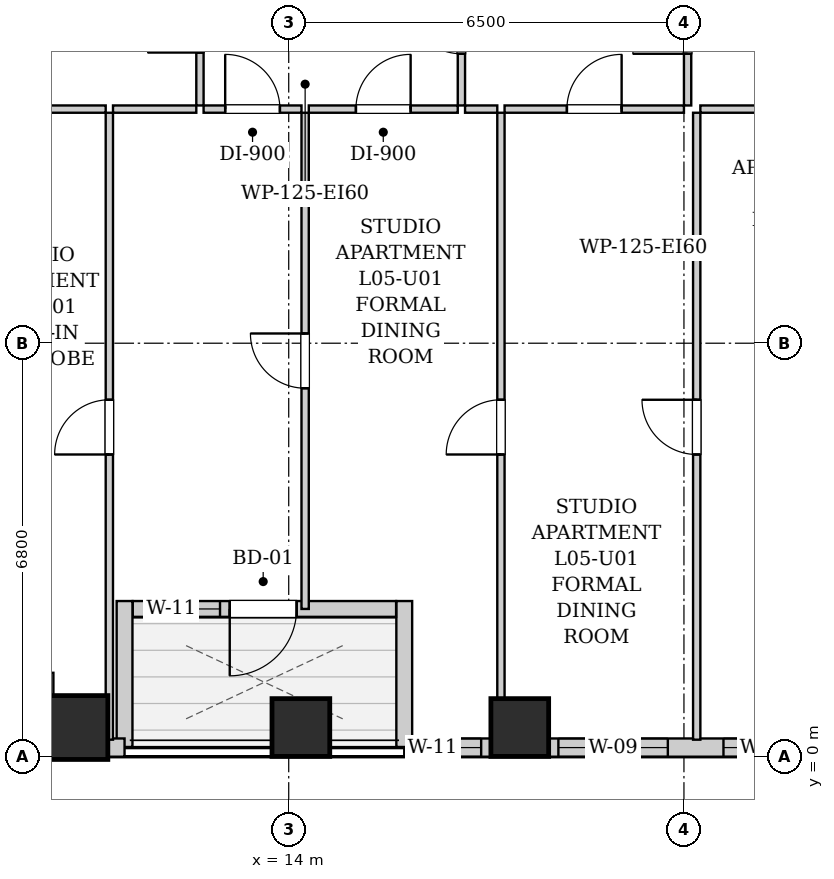
"""IFC4 building model, lengths in metres.
Left out: names, types, materials, properties, quantities, classifications, styles, units other than length and angle.
Written with IfcOpenShell. Run it as: python <this file> out.ifc"""

import sys

from ifc_helpers import new_model, si_unit, direction, frame, frame_2d, origin, origin_2d, place, context, subcontext, project, spatial, rectangle, extrude, element, fill, save


model = new_model("IFC4")
c1 = context("Model", 3, precision=1e-05, world=origin(), true_north=direction((0.0, 1.0)))
c2 = subcontext(c1, "Body", "Model", "MODEL_VIEW")
j1 = project(units=[si_unit("LENGTHUNIT", "METRE"), si_unit("PLANEANGLEUNIT", "RADIAN")], contexts=[c1])
p1 = place(None, origin())
s1 = spatial("IfcSite", under=j1, at=p1, CompositionType="ELEMENT")
p2 = place(p1, origin())
s2 = spatial("IfcBuilding", under=s1, at=p2, CompositionType="ELEMENT")
p3 = place(p2, frame((0.0, 0.0, 25.8)))
s3 = spatial("IfcBuildingStorey", under=s2, at=p3, CompositionType="ELEMENT", Elevation=25.8)
p4 = place(p3, frame((10.5, 0.48, 0.0), z_axis=(0.0, 0.0, 1.0), x_axis=(1.0, 0.0, 0.0)))
e1 = element("IfcColumn", 1, at=p4, inside=s3, PredefinedType="COLUMN", context=c2, shape_type="SweptSolid", body=[
    extrude(rectangle(XDim=1.05, YDim=1.05, at=origin_2d()), origin(), (0.0, 0.0, 1.0), 3.2),
])
for number, where, z_axis, x_axis in (
    (2, (14.2, 0.48, 0.0), (0.0, 0.0, 1.0), (1.0, 0.0, 0.0)),
    (3, (17.8, 0.48, 0.0), (0.0, 0.0, 1.0), (1.0, 0.0, 0.0)),
):
    element("IfcColumn", number, at=place(p3, frame(where, z_axis=z_axis, x_axis=x_axis)), inside=s3, PredefinedType="COLUMN", context=c2, shape_type="SweptSolid", body=[
        extrude(rectangle(XDim=0.95, YDim=0.95, at=origin_2d()), origin(), (0.0, 0.0, 1.0), 3.2),
    ])
p5 = place(p3, frame((44.0, 0.15, 0.0), z_axis=(0.0, 0.0, 1.0), x_axis=(-1.0, 0.0, 0.0)))
e4 = element("IfcWall", 4, at=p5, inside=s3, PredefinedType="SOLIDWALL", context=c2, shape_type="SweptSolid", body=[
    extrude(rectangle(XDim=28.1, YDim=0.3, at=frame_2d((14.05, 0.0))), origin(), (0.0, 0.0, 1.0), 1.975),
])
p6 = place(p5, frame((26.835, 0.0, 0.55)))
e5 = element("IfcOpeningElement", 5, at=p6, cuts=e4, PredefinedType="OPENING", context=c2, shape_type="SweptSolid", body=[
    extrude(rectangle(XDim=0.85, YDim=1.2, at=frame_2d((0.425, 0.6))), frame((0.0, 0.16, 0.0), z_axis=(0.0, -1.0, 0.0), x_axis=(1.0, 0.0, 0.0)), (0.0, 0.0, 1.0), 0.32),
])
p7 = place(p5, frame((23.765, 0.0, 0.55)))
e6 = element("IfcOpeningElement", 6, at=p7, cuts=e4, PredefinedType="OPENING", context=c2, shape_type="SweptSolid", body=[
    extrude(rectangle(XDim=1.8, YDim=1.2, at=frame_2d((0.9, 0.6))), frame((0.0, 0.16, 0.0), z_axis=(0.0, -1.0, 0.0), x_axis=(1.0, 0.0, 0.0)), (0.0, 0.0, 1.0), 0.32),
])
p8 = place(p5, frame((21.5, 0.0, 0.55)))
e7 = element("IfcOpeningElement", 7, at=p8, cuts=e4, PredefinedType="OPENING", context=c2, shape_type="SweptSolid", body=[
    extrude(rectangle(XDim=1.35, YDim=1.2, at=frame_2d((0.675, 0.6))), frame((0.0, 0.16, 0.0), z_axis=(0.0, -1.0, 0.0), x_axis=(1.0, 0.0, 0.0)), (0.0, 0.0, 1.0), 0.32),
])
p9 = place(p5, frame((14.352, 0.0, 0.55)))
e8 = element("IfcOpeningElement", 8, at=p9, cuts=e4, PredefinedType="OPENING", context=c2, shape_type="SweptSolid", body=[
    extrude(rectangle(XDim=1.8, YDim=1.2, at=frame_2d((0.9, 0.6))), frame((0.0, 0.16, 0.0), z_axis=(0.0, -1.0, 0.0), x_axis=(1.0, 0.0, 0.0)), (0.0, 0.0, 1.0), 0.32),
])
p10 = place(p5, frame((11.435, 0.0, 0.55)))
e9 = element("IfcOpeningElement", 9, at=p10, cuts=e4, PredefinedType="OPENING", context=c2, shape_type="SweptSolid", body=[
    extrude(rectangle(XDim=1.8, YDim=1.2, at=frame_2d((0.9, 0.6))), frame((0.0, 0.16, 0.0), z_axis=(0.0, -1.0, 0.0), x_axis=(1.0, 0.0, 0.0)), (0.0, 0.0, 1.0), 0.32),
])
p11 = place(p5, frame((7.891, 0.0, 0.55)))
e10 = element("IfcOpeningElement", 10, at=p11, cuts=e4, PredefinedType="OPENING", context=c2, shape_type="SweptSolid", body=[
    extrude(rectangle(XDim=1.8, YDim=1.2, at=frame_2d((0.9, 0.6))), frame((0.0, 0.16, 0.0), z_axis=(0.0, -1.0, 0.0), x_axis=(1.0, 0.0, 0.0)), (0.0, 0.0, 1.0), 0.32),
])
p12 = place(p5, frame((4.315, 0.0, 0.55)))
e11 = element("IfcOpeningElement", 11, at=p12, cuts=e4, PredefinedType="OPENING", context=c2, shape_type="SweptSolid", body=[
    extrude(rectangle(XDim=0.85, YDim=1.2, at=frame_2d((0.425, 0.6))), frame((0.0, 0.16, 0.0), z_axis=(0.0, -1.0, 0.0), x_axis=(1.0, 0.0, 0.0)), (0.0, 0.0, 1.0), 0.32),
])
p13 = place(p3, frame((15.9, 0.16, 0.0), z_axis=(0.0, 0.0, 1.0), x_axis=(0.0, 1.0, 0.0)))
e12 = element("IfcWall", 12, at=p13, inside=s3, PredefinedType="SOLIDWALL", context=c2, shape_type="SweptSolid", body=[
    extrude(rectangle(XDim=2.4, YDim=0.26, at=frame_2d((1.2, 0.0))), origin(), (0.0, 0.0, 1.0), 2.94),
])
p14 = place(p3, frame((15.766, 2.43, 0.0), z_axis=(0.0, 0.0, 1.0), x_axis=(-1.0, 0.0, 0.0)))
e13 = element("IfcWall", 13, at=p14, inside=s3, PredefinedType="SOLIDWALL", context=c2, shape_type="SweptSolid", body=[
    extrude(rectangle(XDim=4.332, YDim=0.26, at=frame_2d((2.166, 0.0))), origin(), (0.0, 0.0, 1.0), 2.94),
])
p15 = place(p14, frame((1.636, 0.0, 0.0)))
e14 = element("IfcOpeningElement", 14, at=p15, cuts=e13, PredefinedType="OPENING", context=c2, shape_type="SweptSolid", body=[
    extrude(rectangle(XDim=1.1, YDim=2.0, at=frame_2d((0.55, 1.0))), frame((0.0, 0.14, 0.0), z_axis=(0.0, -1.0, 0.0), x_axis=(1.0, 0.0, 0.0)), (0.0, 0.0, 1.0), 0.28),
])
p16 = place(p14, frame((2.896, 0.0, 0.55)))
e15 = element("IfcOpeningElement", 15, at=p16, cuts=e13, PredefinedType="OPENING", context=c2, shape_type="SweptSolid", body=[
    extrude(rectangle(XDim=0.85, YDim=1.2, at=frame_2d((0.425, 0.6))), frame((0.0, 0.14, 0.0), z_axis=(0.0, -1.0, 0.0), x_axis=(1.0, 0.0, 0.0)), (0.0, 0.0, 1.0), 0.28),
])
p17 = place(p3, frame((11.3, 2.56, 0.0), z_axis=(0.0, 0.0, 1.0), x_axis=(0.0, -1.0, 0.0)))
e16 = element("IfcWall", 16, at=p17, inside=s3, PredefinedType="SOLIDWALL", context=c2, shape_type="SweptSolid", body=[
    extrude(rectangle(XDim=2.4, YDim=0.26, at=frame_2d((1.2, 0.0))), origin(), (0.0, 0.0, 1.0), 2.94),
])
p18 = place(p3, frame((11.3, 0.15, 0.0), z_axis=(0.0, 0.0, 1.0), x_axis=(-1.0, 0.0, 0.0)))
e17 = element("IfcWall", 17, at=p18, inside=s3, PredefinedType="SOLIDWALL", context=c2, shape_type="SweptSolid", body=[
    extrude(rectangle(XDim=1.3, YDim=0.3, at=frame_2d((0.65, 0.0))), origin(), (0.0, 0.0, 1.0), 1.975),
])
p19 = place(p3, frame((10.0, 0.302, 0.0), z_axis=(0.0, 0.0, 1.0), x_axis=(0.0, 1.0, 0.0)))
e18 = element("IfcWall", 18, at=p19, inside=s3, PredefinedType="SOLIDWALL", context=c2, shape_type="SweptSolid", body=[
    extrude(rectangle(XDim=1.078, YDim=0.26, at=frame_2d((0.539, 0.0))), origin(), (0.0, 0.0, 1.0), 2.94),
])
p20 = place(p3, frame((12.54, 10.71, 0.0), z_axis=(0.0, 0.0, 1.0), x_axis=(0.0, 1.0, 0.0)))
e19 = element("IfcWall", 19, at=p20, inside=s3, PredefinedType="PARTITIONING", context=c2, shape_type="SweptSolid", body=[
    extrude(rectangle(XDim=2.6, YDim=0.12, at=frame_2d((1.3, 0.0))), origin(), (0.0, 0.0, 1.0), 2.94),
])
p21 = place(p20, frame((0.87, 0.0, 0.0)))
e20 = element("IfcOpeningElement", 20, at=p21, cuts=e19, PredefinedType="OPENING", context=c2, shape_type="SweptSolid", body=[
    extrude(rectangle(XDim=0.86, YDim=2.05, at=frame_2d((0.43, 1.025))), frame((0.0, 0.07, 0.0), z_axis=(0.0, -1.0, 0.0), x_axis=(1.0, 0.0, 0.0)), (0.0, 0.0, 1.0), 0.14),
])
p22 = place(p3, frame((10.08, 10.65, 0.0), z_axis=(0.0, 0.0, 1.0), x_axis=(1.0, 0.0, 0.0)))
e21 = element("IfcWall", 21, at=p22, inside=s3, PredefinedType="PARTITIONING", context=c2, shape_type="SweptSolid", body=[
    extrude(rectangle(XDim=0.91, YDim=0.12, at=frame_2d((0.455, 0.0))), origin(), (0.0, 0.0, 1.0), 2.94),
])
p23 = place(p3, frame((11.11, 10.65, 0.0), z_axis=(0.0, 0.0, 1.0), x_axis=(1.0, 0.0, 0.0)))
e22 = element("IfcWall", 22, at=p23, inside=s3, PredefinedType="PARTITIONING", context=c2, shape_type="SweptSolid", body=[
    extrude(rectangle(XDim=1.37, YDim=0.12, at=frame_2d((0.685, 0.0))), origin(), (0.0, 0.0, 1.0), 2.94),
])
p24 = place(p3, frame((16.84, 10.71, 0.0), z_axis=(0.0, 0.0, 1.0), x_axis=(0.0, 1.0, 0.0)))
e23 = element("IfcWall", 23, at=p24, inside=s3, PredefinedType="PARTITIONING", context=c2, shape_type="SweptSolid", body=[
    extrude(rectangle(XDim=2.6, YDim=0.12, at=frame_2d((1.3, 0.0))), origin(), (0.0, 0.0, 1.0), 2.94),
])
p25 = place(p24, frame((0.85, 0.0, 0.0)))
e24 = element("IfcOpeningElement", 24, at=p25, cuts=e23, PredefinedType="OPENING", context=c2, shape_type="SweptSolid", body=[
    extrude(rectangle(XDim=0.9, YDim=2.05, at=frame_2d((0.45, 1.025))), frame((0.0, 0.07, 0.0), z_axis=(0.0, -1.0, 0.0), x_axis=(1.0, 0.0, 0.0)), (0.0, 0.0, 1.0), 0.14),
])
p26 = place(p3, frame((12.6, 10.65, 0.0), z_axis=(0.0, 0.0, 1.0), x_axis=(1.0, 0.0, 0.0)))
e25 = element("IfcWall", 25, at=p26, inside=s3, PredefinedType="PARTITIONING", context=c2, shape_type="SweptSolid", body=[
    extrude(rectangle(XDim=1.61, YDim=0.12, at=frame_2d((0.805, 0.0))), origin(), (0.0, 0.0, 1.0), 2.94),
])
p27 = place(p26, frame((0.355, 0.0, 0.0)))
e26 = element("IfcOpeningElement", 26, at=p27, cuts=e25, PredefinedType="OPENING", context=c2, shape_type="SweptSolid", body=[
    extrude(rectangle(XDim=0.9, YDim=2.05, at=frame_2d((0.45, 1.025))), frame((0.0, 0.07, 0.0), z_axis=(0.0, -1.0, 0.0), x_axis=(1.0, 0.0, 0.0)), (0.0, 0.0, 1.0), 0.14),
])
p28 = place(p3, frame((14.33, 10.65, 0.0), z_axis=(0.0, 0.0, 1.0), x_axis=(1.0, 0.0, 0.0)))
e27 = element("IfcWall", 27, at=p28, inside=s3, PredefinedType="PARTITIONING", context=c2, shape_type="SweptSolid", body=[
    extrude(rectangle(XDim=2.45, YDim=0.12, at=frame_2d((1.225, 0.0))), origin(), (0.0, 0.0, 1.0), 2.94),
])
p29 = place(p28, frame((0.775, 0.0, 0.0)))
e28 = element("IfcOpeningElement", 28, at=p29, cuts=e27, PredefinedType="OPENING", context=c2, shape_type="SweptSolid", body=[
    extrude(rectangle(XDim=0.9, YDim=2.05, at=frame_2d((0.45, 1.025))), frame((0.0, 0.07, 0.0), z_axis=(0.0, -1.0, 0.0), x_axis=(1.0, 0.0, 0.0)), (0.0, 0.0, 1.0), 0.14),
])
p30 = place(p3, frame((20.56, 10.71, 0.0), z_axis=(0.0, 0.0, 1.0), x_axis=(0.0, 1.0, 0.0)))
e29 = element("IfcWall", 29, at=p30, inside=s3, PredefinedType="PARTITIONING", context=c2, shape_type="SweptSolid", body=[
    extrude(rectangle(XDim=2.6, YDim=0.12, at=frame_2d((1.3, 0.0))), origin(), (0.0, 0.0, 1.0), 2.94),
])
p31 = place(p30, frame((0.85, 0.0, 0.0)))
e30 = element("IfcOpeningElement", 30, at=p31, cuts=e29, PredefinedType="OPENING", context=c2, shape_type="SweptSolid", body=[
    extrude(rectangle(XDim=0.9, YDim=2.05, at=frame_2d((0.45, 1.025))), frame((0.0, 0.07, 0.0), z_axis=(0.0, -1.0, 0.0), x_axis=(1.0, 0.0, 0.0)), (0.0, 0.0, 1.0), 0.14),
])
p32 = place(p3, frame((16.9, 10.65, 0.0), z_axis=(0.0, 0.0, 1.0), x_axis=(1.0, 0.0, 0.0)))
e31 = element("IfcWall", 31, at=p32, inside=s3, PredefinedType="PARTITIONING", context=c2, shape_type="SweptSolid", body=[
    extrude(rectangle(XDim=0.53, YDim=0.12, at=frame_2d((0.265, 0.0))), origin(), (0.0, 0.0, 1.0), 2.94),
])
p33 = place(p3, frame((17.55, 10.65, 0.0), z_axis=(0.0, 0.0, 1.0), x_axis=(1.0, 0.0, 0.0)))
e32 = element("IfcWall", 32, at=p33, inside=s3, PredefinedType="PARTITIONING", context=c2, shape_type="SweptSolid", body=[
    extrude(rectangle(XDim=2.95, YDim=0.12, at=frame_2d((1.475, 0.0))), origin(), (0.0, 0.0, 1.0), 2.94),
])
p34 = place(p33, frame((1.025, 0.0, 0.0)))
e33 = element("IfcOpeningElement", 33, at=p34, cuts=e32, PredefinedType="OPENING", context=c2, shape_type="SweptSolid", body=[
    extrude(rectangle(XDim=0.9, YDim=2.05, at=frame_2d((0.45, 1.025))), frame((0.0, 0.07, 0.0), z_axis=(0.0, -1.0, 0.0), x_axis=(1.0, 0.0, 0.0)), (0.0, 0.0, 1.0), 0.14),
])
p35 = place(p3, frame((20.77, 10.65, 0.0), z_axis=(0.0, 0.0, 1.0), x_axis=(1.0, 0.0, 0.0)))
e34 = element("IfcWall", 34, at=p35, inside=s3, PredefinedType="PARTITIONING", context=c2, shape_type="SweptSolid", body=[
    extrude(rectangle(XDim=3.0, YDim=0.12, at=frame_2d((1.5, 0.0))), origin(), (0.0, 0.0, 1.0), 2.94),
])
p36 = place(p35, frame((1.05, 0.0, 0.0)))
e35 = element("IfcOpeningElement", 35, at=p36, cuts=e34, PredefinedType="OPENING", context=c2, shape_type="SweptSolid", body=[
    extrude(rectangle(XDim=0.9, YDim=2.05, at=frame_2d((0.45, 1.025))), frame((0.0, 0.07, 0.0), z_axis=(0.0, -1.0, 0.0), x_axis=(1.0, 0.0, 0.0)), (0.0, 0.0, 1.0), 0.14),
])
p37 = place(p3, frame((11.05, 0.28, 0.0), z_axis=(0.0, 0.0, 1.0), x_axis=(0.0, 1.0, 0.0)))
e36 = element("IfcWall", 36, at=p37, inside=s3, PredefinedType="PARTITIONING", context=c2, shape_type="SweptSolid", body=[
    extrude(rectangle(XDim=10.31, YDim=0.12, at=frame_2d((5.155, 0.0))), origin(), (0.0, 0.0, 1.0), 2.94),
])
p38 = place(p37, frame((4.69, 0.0, 0.0)))
e37 = element("IfcOpeningElement", 37, at=p38, cuts=e36, PredefinedType="OPENING", context=c2, shape_type="SweptSolid", body=[
    extrude(rectangle(XDim=0.9, YDim=2.05, at=frame_2d((0.45, 1.025))), frame((0.0, 0.07, 0.0), z_axis=(0.0, -1.0, 0.0), x_axis=(1.0, 0.0, 0.0)), (0.0, 0.0, 1.0), 0.14),
])
p39 = place(p3, frame((14.27, 2.43, 0.0), z_axis=(0.0, 0.0, 1.0), x_axis=(0.0, 1.0, 0.0)))
e38 = element("IfcWall", 38, at=p39, inside=s3, PredefinedType="PARTITIONING", context=c2, shape_type="SweptSolid", body=[
    extrude(rectangle(XDim=8.16, YDim=0.12, at=frame_2d((4.08, 0.0))), origin(), (0.0, 0.0, 1.0), 2.94),
])
p40 = place(p39, frame((3.63, 0.0, 0.0)))
e39 = element("IfcOpeningElement", 39, at=p40, cuts=e38, PredefinedType="OPENING", context=c2, shape_type="SweptSolid", body=[
    extrude(rectangle(XDim=0.9, YDim=2.05, at=frame_2d((0.45, 1.025))), frame((0.0, 0.07, 0.0), z_axis=(0.0, -1.0, 0.0), x_axis=(1.0, 0.0, 0.0)), (0.0, 0.0, 1.0), 0.14),
])
p41 = place(p3, frame((17.49, 0.28, 0.0), z_axis=(0.0, 0.0, 1.0), x_axis=(0.0, 1.0, 0.0)))
e40 = element("IfcWall", 40, at=p41, inside=s3, PredefinedType="PARTITIONING", context=c2, shape_type="SweptSolid", body=[
    extrude(rectangle(XDim=10.31, YDim=0.12, at=frame_2d((5.155, 0.0))), origin(), (0.0, 0.0, 1.0), 2.94),
])
p42 = place(p41, frame((4.69, 0.0, 0.0)))
e41 = element("IfcOpeningElement", 41, at=p42, cuts=e40, PredefinedType="OPENING", context=c2, shape_type="SweptSolid", body=[
    extrude(rectangle(XDim=0.9, YDim=2.05, at=frame_2d((0.45, 1.025))), frame((0.0, 0.07, 0.0), z_axis=(0.0, -1.0, 0.0), x_axis=(1.0, 0.0, 0.0)), (0.0, 0.0, 1.0), 0.14),
])
p43 = place(p3, frame((20.71, 0.28, 0.0), z_axis=(0.0, 0.0, 1.0), x_axis=(0.0, 1.0, 0.0)))
e42 = element("IfcWall", 42, at=p43, inside=s3, PredefinedType="PARTITIONING", context=c2, shape_type="SweptSolid", body=[
    extrude(rectangle(XDim=10.31, YDim=0.12, at=frame_2d((5.155, 0.0))), origin(), (0.0, 0.0, 1.0), 2.94),
])
p44 = place(p43, frame((4.69, 0.0, 0.0)))
e43 = element("IfcOpeningElement", 43, at=p44, cuts=e42, PredefinedType="OPENING", context=c2, shape_type="SweptSolid", body=[
    extrude(rectangle(XDim=0.9, YDim=2.05, at=frame_2d((0.45, 1.025))), frame((0.0, 0.07, 0.0), z_axis=(0.0, -1.0, 0.0), x_axis=(1.0, 0.0, 0.0)), (0.0, 0.0, 1.0), 0.14),
])
p45 = place(p21, origin())
e44 = element("IfcDoor", 44, at=p45, inside=s3, OperationType="SINGLE_SWING_LEFT", PredefinedType="DOOR", context=c2, shape_type="SweptSolid", body=[
    extrude(rectangle(XDim=0.86, YDim=2.05, at=frame_2d((0.43, 1.025))), frame((0.0, 0.025, 0.0), z_axis=(0.0, -1.0, 0.0), x_axis=(1.0, 0.0, 0.0)), (0.0, 0.0, 1.0), 0.05),
])
fill(e20, e44)
p46 = place(p25, origin())
e45 = element("IfcDoor", 45, at=p46, inside=s3, OperationType="SINGLE_SWING_RIGHT", PredefinedType="DOOR", context=c2, shape_type="SweptSolid", body=[
    extrude(rectangle(XDim=0.9, YDim=2.05, at=frame_2d((0.45, 1.025))), frame((0.0, 0.025, 0.0), z_axis=(0.0, -1.0, 0.0), x_axis=(1.0, 0.0, 0.0)), (0.0, 0.0, 1.0), 0.05),
])
fill(e24, e45)
p47 = place(p27, origin())
e46 = element("IfcDoor", 46, at=p47, inside=s3, OperationType="SINGLE_SWING_LEFT", PredefinedType="DOOR", context=c2, shape_type="SweptSolid", body=[
    extrude(rectangle(XDim=0.9, YDim=2.05, at=frame_2d((0.45, 1.025))), frame((0.0, 0.025, 0.0), z_axis=(0.0, -1.0, 0.0), x_axis=(1.0, 0.0, 0.0)), (0.0, 0.0, 1.0), 0.05),
])
fill(e26, e46)
p48 = place(p29, origin())
e47 = element("IfcDoor", 47, at=p48, inside=s3, OperationType="SINGLE_SWING_RIGHT", PredefinedType="DOOR", context=c2, shape_type="SweptSolid", body=[
    extrude(rectangle(XDim=0.9, YDim=2.05, at=frame_2d((0.45, 1.025))), frame((0.0, 0.025, 0.0), z_axis=(0.0, -1.0, 0.0), x_axis=(1.0, 0.0, 0.0)), (0.0, 0.0, 1.0), 0.05),
])
fill(e28, e47)
p49 = place(p31, origin())
e48 = element("IfcDoor", 48, at=p49, inside=s3, OperationType="SINGLE_SWING_LEFT", PredefinedType="DOOR", context=c2, shape_type="SweptSolid", body=[
    extrude(rectangle(XDim=0.9, YDim=2.05, at=frame_2d((0.45, 1.025))), frame((0.0, 0.025, 0.0), z_axis=(0.0, -1.0, 0.0), x_axis=(1.0, 0.0, 0.0)), (0.0, 0.0, 1.0), 0.05),
])
fill(e30, e48)
p50 = place(p34, origin())
e49 = element("IfcDoor", 49, at=p50, inside=s3, OperationType="SINGLE_SWING_RIGHT", PredefinedType="DOOR", context=c2, shape_type="SweptSolid", body=[
    extrude(rectangle(XDim=0.9, YDim=2.05, at=frame_2d((0.45, 1.025))), frame((0.0, 0.025, 0.0), z_axis=(0.0, -1.0, 0.0), x_axis=(1.0, 0.0, 0.0)), (0.0, 0.0, 1.0), 0.05),
])
fill(e33, e49)
p51 = place(p38, origin())
e50 = element("IfcDoor", 50, at=p51, inside=s3, OperationType="SINGLE_SWING_LEFT", PredefinedType="DOOR", context=c2, shape_type="SweptSolid", body=[
    extrude(rectangle(XDim=0.9, YDim=2.05, at=frame_2d((0.45, 1.025))), frame((0.0, 0.025, 0.0), z_axis=(0.0, -1.0, 0.0), x_axis=(1.0, 0.0, 0.0)), (0.0, 0.0, 1.0), 0.05),
])
fill(e37, e50)
p52 = place(p40, origin())
e51 = element("IfcDoor", 51, at=p52, inside=s3, OperationType="SINGLE_SWING_RIGHT", PredefinedType="DOOR", context=c2, shape_type="SweptSolid", body=[
    extrude(rectangle(XDim=0.9, YDim=2.05, at=frame_2d((0.45, 1.025))), frame((0.0, 0.025, 0.0), z_axis=(0.0, -1.0, 0.0), x_axis=(1.0, 0.0, 0.0)), (0.0, 0.0, 1.0), 0.05),
])
fill(e39, e51)
p53 = place(p42, origin())
e52 = element("IfcDoor", 52, at=p53, inside=s3, OperationType="SINGLE_SWING_LEFT", PredefinedType="DOOR", context=c2, shape_type="SweptSolid", body=[
    extrude(rectangle(XDim=0.9, YDim=2.05, at=frame_2d((0.45, 1.025))), frame((0.0, 0.025, 0.0), z_axis=(0.0, -1.0, 0.0), x_axis=(1.0, 0.0, 0.0)), (0.0, 0.0, 1.0), 0.05),
])
fill(e41, e52)
p54 = place(p44, origin())
e53 = element("IfcDoor", 53, at=p54, inside=s3, OperationType="SINGLE_SWING_RIGHT", PredefinedType="DOOR", context=c2, shape_type="SweptSolid", body=[
    extrude(rectangle(XDim=0.9, YDim=2.05, at=frame_2d((0.45, 1.025))), frame((0.0, 0.025, 0.0), z_axis=(0.0, -1.0, 0.0), x_axis=(1.0, 0.0, 0.0)), (0.0, 0.0, 1.0), 0.05),
])
fill(e43, e53)
p55 = place(p15, origin())
e54 = element("IfcDoor", 54, at=p55, inside=s3, OperationType="SINGLE_SWING_RIGHT", PredefinedType="DOOR", context=c2, shape_type="SweptSolid", body=[
    extrude(rectangle(XDim=1.1, YDim=2.0, at=frame_2d((0.55, 1.0))), frame((0.0, 0.025, 0.0), z_axis=(0.0, -1.0, 0.0), x_axis=(1.0, 0.0, 0.0)), (0.0, 0.0, 1.0), 0.05),
])
fill(e14, e54)
p56 = place(p16, origin())
e55 = element("IfcWindow", 55, at=p56, inside=s3, PartitioningType="SINGLE_PANEL", PredefinedType="WINDOW", context=c2, shape_type="SweptSolid", body=[
    extrude(rectangle(XDim=0.85, YDim=1.2, at=frame_2d((0.425, 0.6))), frame((0.0, 0.03, 0.0), z_axis=(0.0, -1.0, 0.0), x_axis=(1.0, 0.0, 0.0)), (0.0, 0.0, 1.0), 0.06),
])
fill(e15, e55)
p57 = place(p6, origin())
e56 = element("IfcWindow", 56, at=p57, inside=s3, PartitioningType="SINGLE_PANEL", PredefinedType="WINDOW", context=c2, shape_type="SweptSolid", body=[
    extrude(rectangle(XDim=0.85, YDim=1.2, at=frame_2d((0.425, 0.6))), frame((0.0, 0.03, 0.0), z_axis=(0.0, -1.0, 0.0), x_axis=(1.0, 0.0, 0.0)), (0.0, 0.0, 1.0), 0.06),
])
fill(e5, e56)
p58 = place(p7, origin())
e57 = element("IfcWindow", 57, at=p58, inside=s3, PartitioningType="DOUBLE_PANEL_VERTICAL", PredefinedType="WINDOW", context=c2, shape_type="SweptSolid", body=[
    extrude(rectangle(XDim=1.8, YDim=1.2, at=frame_2d((0.9, 0.6))), frame((0.0, 0.03, 0.0), z_axis=(0.0, -1.0, 0.0), x_axis=(1.0, 0.0, 0.0)), (0.0, 0.0, 1.0), 0.06),
])
fill(e6, e57)
p59 = place(p8, origin())
e58 = element("IfcWindow", 58, at=p59, inside=s3, PartitioningType="SINGLE_PANEL", PredefinedType="WINDOW", context=c2, shape_type="SweptSolid", body=[
    extrude(rectangle(XDim=1.35, YDim=1.2, at=frame_2d((0.675, 0.6))), frame((0.0, 0.03, 0.0), z_axis=(0.0, -1.0, 0.0), x_axis=(1.0, 0.0, 0.0)), (0.0, 0.0, 1.0), 0.06),
])
fill(e7, e58)
save(model, sys.argv[1])
